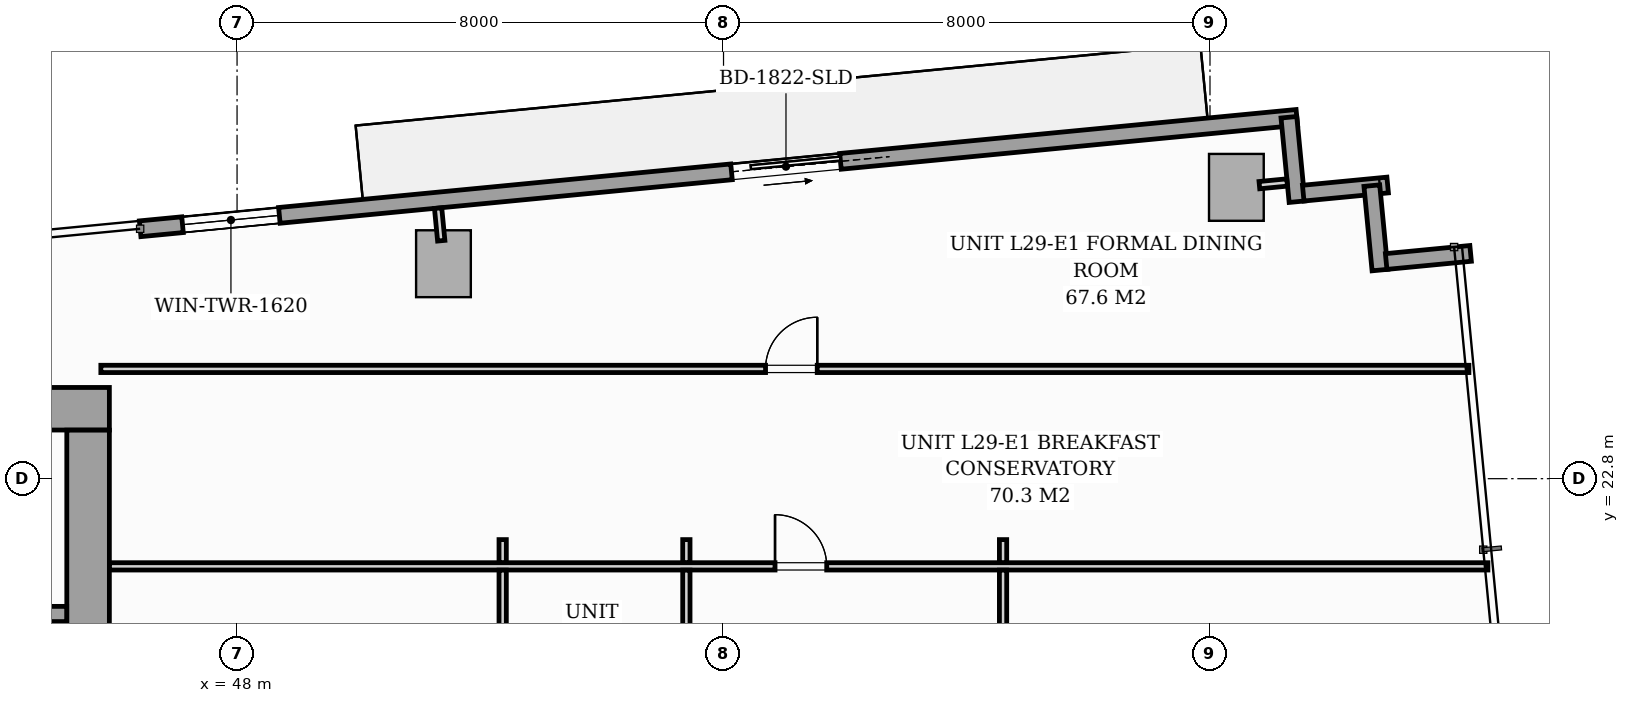
"""IFC4 building model, lengths in metres.
Left out: names, types, materials, properties, quantities, classifications, styles, units other than length and angle.
Written with IfcOpenShell. Run it as: python <this file> out.ifc"""

import sys

from ifc_helpers import new_model, si_unit, direction, frame, frame_2d, origin, origin_2d, place, context, subcontext, project, spatial, rectangle, i_section, extrude, source, transform, mapped, element, fill, save


model = new_model("IFC4")
c1 = context("Model", 3, precision=1e-05, world=origin(), true_north=direction((0.0, 1.0)))
c2 = subcontext(c1, "Body", "Model", "MODEL_VIEW")
j1 = project(units=[si_unit("LENGTHUNIT", "METRE"), si_unit("PLANEANGLEUNIT", "RADIAN")], contexts=[c1])
p1 = place(None, origin())
s1 = spatial("IfcSite", under=j1, at=p1, CompositionType="ELEMENT")
p2 = place(p1, origin())
s2 = spatial("IfcBuilding", under=s1, at=p2, CompositionType="ELEMENT")
p3 = place(p2, frame((0.0, 0.0, 103.4)))
s3 = spatial("IfcBuildingStorey", under=s2, at=p3, CompositionType="ELEMENT", Elevation=103.4)
m1 = source(origin(), c2, "Body", "SweptSolid", [
    extrude(i_section(OverallWidth=0.427, OverallDepth=0.483, WebThickness=0.051, FlangeThickness=0.082, FilletRadius=0.018, at=origin_2d()), origin(), (0.0, 0.0, 1.0), 3.196),
])
p4 = place(p3, frame((45.6, 24.0, 0.002), z_axis=(0.0, 0.0, 1.0), x_axis=(1.0, 0.0, 0.0)))
e1 = element("IfcColumn", 1, at=p4, inside=s3, PredefinedType="PILASTER", context=c2, shape_type="MappedRepresentation", body=[
    mapped(m1, transform((0.0, 0.0, 0.0), scale=1.0)),
])
m2 = source(origin(), c2, "Body", "SweptSolid", [
    extrude(rectangle(XDim=0.9, YDim=1.1, at=origin_2d()), origin(), (0.0, 0.0, 1.0), 3.196),
])
for number, where, z_axis, x_axis in (
    (2, (51.394, 26.335, 0.002), (0.0, 0.0, 1.0), (0.995, 0.096, 0.0)),
    (3, (64.434, 27.591, 0.002), (0.0, 0.0, 1.0), (0.995, 0.096, 0.0)),
):
    element("IfcColumn", number, at=place(p3, frame(where, z_axis=z_axis, x_axis=x_axis)), inside=s3, PredefinedType="COLUMN", context=c2, shape_type="MappedRepresentation", body=[
        mapped(m2, transform((0.0, 0.0, 0.0), scale=1.0)),
    ])
p5 = place(p3, frame((46.406, 26.91, 0.0), z_axis=(0.0, 0.0, 1.0), x_axis=(0.995396638587, 0.095841180552, 0.0)))
e4 = element("IfcWall", 4, at=p5, inside=s3, PredefinedType="STANDARD", context=c2, shape_type="SweptSolid", body=[
    extrude(rectangle(XDim=19.11, YDim=0.26, at=frame_2d((9.555, 0.0))), origin(), (0.0, 0.0, 1.0), 2.94),
])
p6 = place(p5, frame((9.77, 0.0, 0.0)))
e5 = element("IfcOpeningElement", 5, at=p6, cuts=e4, PredefinedType="OPENING", context=c2, shape_type="SweptSolid", body=[
    extrude(rectangle(XDim=1.8, YDim=2.06, at=frame_2d((0.9, 1.03))), frame((0.0, 0.14, 0.0), z_axis=(0.0, -1.0, 0.0), x_axis=(1.0, 0.0, 0.0)), (0.0, 0.0, 1.0), 0.28),
])
p7 = place(p5, frame((0.7, 0.0, 0.65)))
e6 = element("IfcOpeningElement", 6, at=p7, cuts=e4, PredefinedType="OPENING", context=c2, shape_type="SweptSolid", body=[
    extrude(rectangle(XDim=1.6, YDim=1.5, at=frame_2d((0.8, 0.75))), frame((0.0, 0.14, 0.0), z_axis=(0.0, -1.0, 0.0), x_axis=(1.0, 0.0, 0.0)), (0.0, 0.0, 1.0), 0.28),
])
for number, where, z_axis, x_axis in (
    (7, (65.298, 28.744, 0.0), (0.0, 0.0, 1.0), (0.096, -0.995, 0.0)),
    (8, (65.533, 27.496, 0.0), (0.0, 0.0, 1.0), (0.995, 0.096, 0.0)),
):
    element("IfcWall", number, at=place(p3, frame(where, z_axis=z_axis, x_axis=x_axis)), inside=s3, PredefinedType="STANDARD", context=c2, shape_type="SweptSolid", body=[
        extrude(rectangle(XDim=1.395, YDim=0.26, at=frame_2d((0.698, 0.0))), origin(), (0.0, 0.0, 1.0), 2.94),
    ])
p8 = place(p3, frame((66.662, 27.619, 0.0), z_axis=(0.0, 0.0, 1.0), x_axis=(0.095742423056, -0.99540614245, 0.0)))
e9 = element("IfcWall", 9, at=p8, inside=s3, PredefinedType="STANDARD", context=c2, shape_type="SweptSolid", body=[
    extrude(rectangle(XDim=1.395, YDim=0.26, at=frame_2d((0.697, 0.0))), origin(), (0.0, 0.0, 1.0), 2.94),
])
p9 = place(p3, frame((66.897, 26.371, 0.0), z_axis=(0.0, 0.0, 1.0), x_axis=(0.995391056452, 0.09589913835, 0.0)))
e10 = element("IfcWall", 10, at=p9, inside=s3, PredefinedType="STANDARD", context=c2, shape_type="SweptSolid", body=[
    extrude(rectangle(XDim=1.395, YDim=0.26, at=frame_2d((0.698, 0.0))), origin(), (0.0, 0.0, 1.0), 2.94),
])
p10 = place(p3, frame((26.1, 23.95, 0.0), z_axis=(0.0, 0.0, 1.0), x_axis=(1.0, 0.0, 0.0)))
e11 = element("IfcWall", 11, at=p10, inside=s3, PredefinedType="SHEAR", context=c2, shape_type="SweptSolid", body=[
    extrude(rectangle(XDim=19.8, YDim=0.7, at=frame_2d((9.9, 0.0))), origin(), (0.0, 0.0, 1.0), 3.2),
])
p11 = place(p3, frame((45.55, 17.802, 0.0), z_axis=(0.0, 0.0, 1.0), x_axis=(0.0, 1.0, 0.0)))
e12 = element("IfcWall", 12, at=p11, inside=s3, PredefinedType="SHEAR", context=c2, shape_type="SweptSolid", body=[
    extrude(rectangle(XDim=5.796, YDim=0.7, at=frame_2d((2.898, 0.0))), origin(), (0.0, 0.0, 1.0), 3.2),
])
p12 = place(p3, frame((37.05, 20.575, 0.0), z_axis=(0.0, 0.0, 1.0), x_axis=(1.0, 0.0, 0.0)))
e13 = element("IfcWall", 13, at=p12, inside=s3, PredefinedType="SOLIDWALL", context=c2, shape_type="SweptSolid", body=[
    extrude(rectangle(XDim=8.148, YDim=0.25, at=frame_2d((4.074, 0.0))), origin(), (0.0, 0.0, 1.0), 3.2),
])
p13 = place(p12, frame((6.6, 0.0, 0.0)))
e14 = element("IfcOpeningElement", 14, at=p13, cuts=e13, PredefinedType="OPENING", context=c2, shape_type="SweptSolid", body=[
    extrude(rectangle(XDim=0.95, YDim=2.06, at=frame_2d((0.475, 1.03))), frame((0.0, 0.135, 0.0), z_axis=(0.0, -1.0, 0.0), x_axis=(1.0, 0.0, 0.0)), (0.0, 0.0, 1.0), 0.27),
])
p14 = place(p3, frame((45.76, 24.605, 0.0), z_axis=(0.0, 0.0, 1.0), x_axis=(1.0, 0.0, 0.0)))
e15 = element("IfcWall", 15, at=p14, inside=s3, PredefinedType="PARTITIONING", context=c2, shape_type="SweptSolid", body=[
    extrude(rectangle(XDim=22.498, YDim=0.12, at=frame_2d((11.249, 0.0))), origin(), (0.0, 0.0, 1.0), 2.94),
])
p15 = place(p14, frame((10.931, 0.0, 0.0)))
e16 = element("IfcOpeningElement", 16, at=p15, cuts=e15, PredefinedType="OPENING", context=c2, shape_type="SweptSolid", body=[
    extrude(rectangle(XDim=0.85, YDim=2.05, at=frame_2d((0.425, 1.025))), frame((0.0, 0.07, 0.0), z_axis=(0.0, -1.0, 0.0), x_axis=(1.0, 0.0, 0.0)), (0.0, 0.0, 1.0), 0.14),
])
p16 = place(p3, frame((45.902, 21.358, 0.0), z_axis=(0.0, 0.0, 1.0), x_axis=(1.0, 0.0, 0.0)))
e17 = element("IfcWall", 17, at=p16, inside=s3, PredefinedType="PARTITIONING", context=c2, shape_type="SweptSolid", body=[
    extrude(rectangle(XDim=22.668, YDim=0.12, at=frame_2d((11.334, 0.0))), origin(), (0.0, 0.0, 1.0), 2.94),
])
p17 = place(p16, frame((10.945, 0.0, 0.0)))
e18 = element("IfcOpeningElement", 18, at=p17, cuts=e17, PredefinedType="OPENING", context=c2, shape_type="SweptSolid", body=[
    extrude(rectangle(XDim=0.85, YDim=2.05, at=frame_2d((0.425, 1.025))), frame((0.0, 0.07, 0.0), z_axis=(0.0, -1.0, 0.0), x_axis=(1.0, 0.0, 0.0)), (0.0, 0.0, 1.0), 0.14),
])
p18 = place(p3, frame((60.597, 10.209, 0.0), z_axis=(0.0, 0.0, 1.0), x_axis=(0.0, 1.0, 0.0)))
e19 = element("IfcWall", 19, at=p18, inside=s3, PredefinedType="PARTITIONING", context=c2, shape_type="SweptSolid", body=[
    extrude(rectangle(XDim=11.087, YDim=0.12, at=frame_2d((5.543, 0.0))), origin(), (0.0, 0.0, 1.0), 2.94),
])
p19 = place(p18, frame((5.118, 0.0, 0.0)))
e20 = element("IfcOpeningElement", 20, at=p19, cuts=e19, PredefinedType="OPENING", context=c2, shape_type="SweptSolid", body=[
    extrude(rectangle(XDim=0.85, YDim=2.05, at=frame_2d((0.425, 1.025))), frame((0.0, 0.07, 0.0), z_axis=(0.0, -1.0, 0.0), x_axis=(1.0, 0.0, 0.0)), (0.0, 0.0, 1.0), 0.14),
])
p20 = place(p3, frame((60.597, 21.42, 0.0), z_axis=(0.0, 0.0, 1.0), x_axis=(0.0, 1.0, 0.0)))
e21 = element("IfcWall", 21, at=p20, inside=s3, PredefinedType="PARTITIONING", context=c2, shape_type="SweptSolid", body=[
    extrude(rectangle(XDim=0.378, YDim=0.12, at=frame_2d((0.189, 0.0))), origin(), (0.0, 0.0, 1.0), 2.94),
])
p21 = place(p3, frame((55.389, 10.209, 0.0), z_axis=(0.0, 0.0, 1.0), x_axis=(0.0, 1.0, 0.0)))
e22 = element("IfcWall", 22, at=p21, inside=s3, PredefinedType="PARTITIONING", context=c2, shape_type="SweptSolid", body=[
    extrude(rectangle(XDim=11.087, YDim=0.12, at=frame_2d((5.543, 0.0))), origin(), (0.0, 0.0, 1.0), 2.94),
])
p22 = place(p21, frame((5.118, 0.0, 0.0)))
e23 = element("IfcOpeningElement", 23, at=p22, cuts=e22, PredefinedType="OPENING", context=c2, shape_type="SweptSolid", body=[
    extrude(rectangle(XDim=0.85, YDim=2.05, at=frame_2d((0.425, 1.025))), frame((0.0, 0.07, 0.0), z_axis=(0.0, -1.0, 0.0), x_axis=(1.0, 0.0, 0.0)), (0.0, 0.0, 1.0), 0.14),
])
p23 = place(p3, frame((55.389, 21.42, 0.0), z_axis=(0.0, 0.0, 1.0), x_axis=(0.0, 1.0, 0.0)))
e24 = element("IfcWall", 24, at=p23, inside=s3, PredefinedType="PARTITIONING", context=c2, shape_type="SweptSolid", body=[
    extrude(rectangle(XDim=0.378, YDim=0.12, at=frame_2d((0.189, 0.0))), origin(), (0.0, 0.0, 1.0), 2.94),
])
p24 = place(p3, frame((52.368, 10.209, 0.0), z_axis=(0.0, 0.0, 1.0), x_axis=(0.0, 1.0, 0.0)))
e25 = element("IfcWall", 25, at=p24, inside=s3, PredefinedType="PARTITIONING", context=c2, shape_type="SweptSolid", body=[
    extrude(rectangle(XDim=11.087, YDim=0.12, at=frame_2d((5.543, 0.0))), origin(), (0.0, 0.0, 1.0), 2.94),
])
p25 = place(p24, frame((5.118, 0.0, 0.0)))
e26 = element("IfcOpeningElement", 26, at=p25, cuts=e25, PredefinedType="OPENING", context=c2, shape_type="SweptSolid", body=[
    extrude(rectangle(XDim=0.85, YDim=2.05, at=frame_2d((0.425, 1.025))), frame((0.0, 0.07, 0.0), z_axis=(0.0, -1.0, 0.0), x_axis=(1.0, 0.0, 0.0)), (0.0, 0.0, 1.0), 0.14),
])
p26 = place(p3, frame((52.368, 21.42, 0.0), z_axis=(0.0, 0.0, 1.0), x_axis=(0.0, 1.0, 0.0)))
e27 = element("IfcWall", 27, at=p26, inside=s3, PredefinedType="PARTITIONING", context=c2, shape_type="SweptSolid", body=[
    extrude(rectangle(XDim=0.378, YDim=0.12, at=frame_2d((0.189, 0.0))), origin(), (0.0, 0.0, 1.0), 2.94),
])
p27 = place(p3, frame((51.358, 26.713, 0.0), z_axis=(0.0, 0.0, 1.0), x_axis=(-0.095772948675, 0.995403205893, 0.0)))
e28 = element("IfcWall", 28, at=p27, inside=s3, PredefinedType="PARTITIONING", context=c2, shape_type="SweptSolid", body=[
    extrude(rectangle(XDim=0.538, YDim=0.12, at=frame_2d((0.269, 0.0))), origin(), (0.0, 0.0, 1.0), 2.94),
])
p28 = place(p3, frame((64.812, 27.627, 0.0), z_axis=(0.0, 0.0, 1.0), x_axis=(0.995389482415, 0.095915474751, 0.0)))
e29 = element("IfcWall", 29, at=p28, inside=s3, PredefinedType="PARTITIONING", context=c2, shape_type="SweptSolid", body=[
    extrude(rectangle(XDim=0.458, YDim=0.12, at=frame_2d((0.229, 0.0))), origin(), (0.0, 0.0, 1.0), 2.94),
])
m3 = source(origin(), c2, "Body", "SweptSolid", [
    extrude(rectangle(XDim=1.8, YDim=2.06, at=frame_2d((0.9, 1.03))), frame((0.0, 0.025, 0.0), z_axis=(0.0, -1.0, 0.0), x_axis=(1.0, 0.0, 0.0)), (0.0, 0.0, 1.0), 0.05),
])
p29 = place(p6, origin())
e30 = element("IfcDoor", 30, at=p29, inside=s3, OperationType="SLIDING_TO_RIGHT", PredefinedType="DOOR", context=c2, shape_type="MappedRepresentation", body=[
    mapped(m3, transform((0.0, 0.0, 0.0), scale=1.0)),
])
fill(e5, e30)
m4 = source(origin(), c2, "Body", "SweptSolid", [
    extrude(rectangle(XDim=1.6, YDim=1.5, at=frame_2d((0.8, 0.75))), frame((0.0, 0.03, 0.0), z_axis=(0.0, -1.0, 0.0), x_axis=(1.0, 0.0, 0.0)), (0.0, 0.0, 1.0), 0.06),
])
p30 = place(p7, origin())
e31 = element("IfcWindow", 31, at=p30, inside=s3, PartitioningType="SINGLE_PANEL", PredefinedType="WINDOW", context=c2, shape_type="MappedRepresentation", body=[
    mapped(m4, transform((0.0, 0.0, 0.0), scale=1.0)),
])
fill(e6, e31)
m5 = source(origin(), c2, "Body", "SweptSolid", [
    extrude(rectangle(XDim=0.85, YDim=2.05, at=frame_2d((0.425, 1.025))), frame((0.0, 0.025, 0.0), z_axis=(0.0, -1.0, 0.0), x_axis=(1.0, 0.0, 0.0)), (0.0, 0.0, 1.0), 0.05),
])
p31 = place(p15, origin())
e32 = element("IfcDoor", 32, at=p31, inside=s3, OperationType="SINGLE_SWING_RIGHT", PredefinedType="DOOR", context=c2, shape_type="MappedRepresentation", body=[
    mapped(m5, transform((0.0, 0.0, 0.0), scale=1.0)),
])
fill(e16, e32)
p32 = place(p17, origin())
e33 = element("IfcDoor", 33, at=p32, inside=s3, OperationType="SINGLE_SWING_LEFT", PredefinedType="DOOR", context=c2, shape_type="MappedRepresentation", body=[
    mapped(m5, transform((0.0, 0.0, 0.0), scale=1.0)),
])
fill(e18, e33)
save(model, sys.argv[1])
